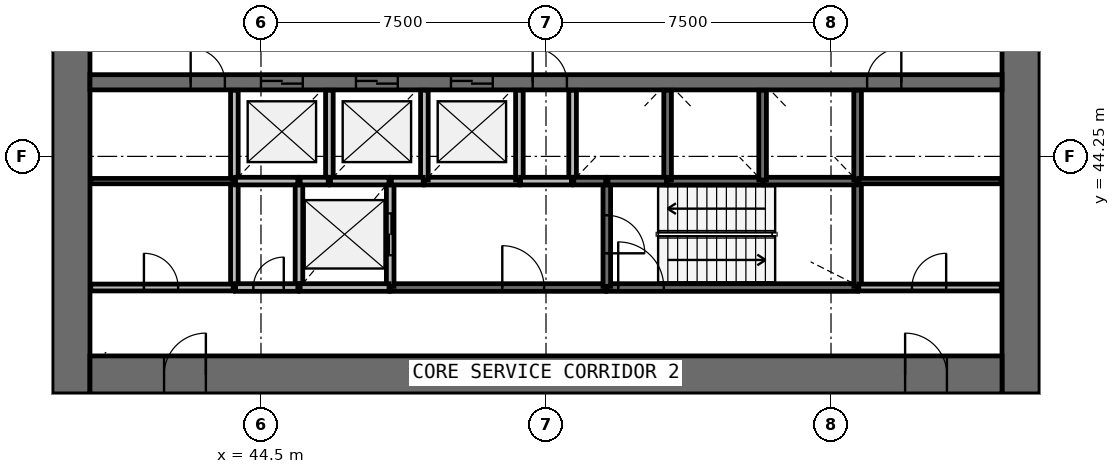
"""IFC4 building model, lengths in metres.
Left out: names, types, materials, properties, quantities, classifications, styles, units other than length and angle.
Written with IfcOpenShell. Run it as: python <this file> out.ifc"""

import sys

from ifc_helpers import new_model, si_unit, direction, frame, frame_2d, origin, place, context, subcontext, project, spatial, rectangle, extrude, source, transform, mapped, element, fill, save


model = new_model("IFC4")
c1 = context("Model", 3, precision=1e-05, world=origin(), true_north=direction((0.0, 1.0)))
c2 = subcontext(c1, "Body", "Model", "MODEL_VIEW")
j1 = project(units=[si_unit("LENGTHUNIT", "METRE"), si_unit("PLANEANGLEUNIT", "RADIAN")], contexts=[c1])
p1 = place(None, origin())
s1 = spatial("IfcSite", under=j1, at=p1, CompositionType="ELEMENT")
p2 = place(p1, origin())
s2 = spatial("IfcBuilding", under=s1, at=p2, CompositionType="ELEMENT")
p3 = place(p2, frame((0.0, 0.0, 18.2)))
s3 = spatial("IfcBuildingStorey", under=s2, at=p3, CompositionType="ELEMENT", Elevation=18.2)
p4 = place(p3, frame((64.5, 38.0, 0.0), z_axis=(0.0, 0.0, 1.0), x_axis=(0.0, 1.0, 0.0)))
e1 = element("IfcWall", 1, at=p4, inside=s3, PredefinedType="SHEAR", context=c2, shape_type="SweptSolid", body=[
    extrude(rectangle(XDim=20.0, YDim=1.0, at=frame_2d((10.0, 0.0))), origin(), (0.0, 0.0, 1.0), 4.4),
])
p5 = place(p4, frame((9.1, 0.0, 0.0)))
e2 = element("IfcOpeningElement", 2, at=p5, cuts=e1, PredefinedType="OPENING", context=c2, shape_type="SweptSolid", body=[
    extrude(rectangle(XDim=1.8, YDim=2.1, at=frame_2d((0.9, 1.05))), frame((0.0, 0.51, 0.0), z_axis=(0.0, -1.0, 0.0), x_axis=(1.0, 0.0, 0.0)), (0.0, 0.0, 1.0), 1.02),
])
p6 = place(p3, frame((39.5, 58.0, 0.0), z_axis=(0.0, 0.0, 1.0), x_axis=(0.0, -1.0, 0.0)))
e3 = element("IfcWall", 3, at=p6, inside=s3, PredefinedType="SHEAR", context=c2, shape_type="SweptSolid", body=[
    extrude(rectangle(XDim=20.0, YDim=1.0, at=frame_2d((10.0, 0.0))), origin(), (0.0, 0.0, 1.0), 4.4),
])
p7 = place(p6, frame((9.1, 0.0, 0.0)))
e4 = element("IfcOpeningElement", 4, at=p7, cuts=e3, PredefinedType="OPENING", context=c2, shape_type="SweptSolid", body=[
    extrude(rectangle(XDim=1.8, YDim=2.1, at=frame_2d((0.9, 1.05))), frame((0.0, 0.51, 0.0), z_axis=(0.0, -1.0, 0.0), x_axis=(1.0, 0.0, 0.0)), (0.0, 0.0, 1.0), 1.02),
])
p8 = place(p3, frame((40.0, 38.5, 0.0), z_axis=(0.0, 0.0, 1.0), x_axis=(1.0, 0.0, 0.0)))
e5 = element("IfcWall", 5, at=p8, inside=s3, PredefinedType="SHEAR", context=c2, shape_type="SweptSolid", body=[
    extrude(rectangle(XDim=24.0, YDim=1.0, at=frame_2d((12.0, 0.0))), origin(), (0.0, 0.0, 1.0), 4.4),
])
p9 = place(p8, frame((21.45, 0.0, 0.0)))
e6 = element("IfcOpeningElement", 6, at=p9, cuts=e5, PredefinedType="OPENING", context=c2, shape_type="SweptSolid", body=[
    extrude(rectangle(XDim=1.1, YDim=2.1, at=frame_2d((0.55, 1.05))), frame((0.0, 0.51, 0.0), z_axis=(0.0, -1.0, 0.0), x_axis=(1.0, 0.0, 0.0)), (0.0, 0.0, 1.0), 1.02),
])
p10 = place(p8, frame((1.95, 0.0, 0.0)))
e7 = element("IfcOpeningElement", 7, at=p10, cuts=e5, PredefinedType="OPENING", context=c2, shape_type="SweptSolid", body=[
    extrude(rectangle(XDim=1.1, YDim=2.1, at=frame_2d((0.55, 1.05))), frame((0.0, 0.51, 0.0), z_axis=(0.0, -1.0, 0.0), x_axis=(1.0, 0.0, 0.0)), (0.0, 0.0, 1.0), 1.02),
])
p11 = place(p3, frame((40.0, 46.2, 0.0), z_axis=(0.0, 0.0, 1.0), x_axis=(1.0, 0.0, 0.0)))
e8 = element("IfcWall", 8, at=p11, inside=s3, PredefinedType="SHEAR", context=c2, shape_type="SweptSolid", body=[
    extrude(rectangle(XDim=24.0, YDim=0.4, at=frame_2d((12.0, 0.0))), origin(), (0.0, 0.0, 1.0), 4.4),
])
p12 = place(p11, frame((4.5, 0.0, 0.0)))
e9 = element("IfcOpeningElement", 9, at=p12, cuts=e8, PredefinedType="OPENING", context=c2, shape_type="SweptSolid", body=[
    extrude(rectangle(XDim=1.1, YDim=2.1, at=frame_2d((0.55, 1.05))), frame((0.0, 0.21, 0.0), z_axis=(0.0, -1.0, 0.0), x_axis=(1.0, 0.0, 0.0)), (0.0, 0.0, 1.0), 0.42),
])
p13 = place(p11, frame((7.0, 0.0, 0.0)))
e10 = element("IfcOpeningElement", 10, at=p13, cuts=e8, PredefinedType="OPENING", context=c2, shape_type="SweptSolid", body=[
    extrude(rectangle(XDim=1.1, YDim=2.1, at=frame_2d((0.55, 1.05))), frame((0.0, 0.21, 0.0), z_axis=(0.0, -1.0, 0.0), x_axis=(1.0, 0.0, 0.0)), (0.0, 0.0, 1.0), 0.42),
])
p14 = place(p11, frame((9.5, 0.0, 0.0)))
e11 = element("IfcOpeningElement", 11, at=p14, cuts=e8, PredefinedType="OPENING", context=c2, shape_type="SweptSolid", body=[
    extrude(rectangle(XDim=1.1, YDim=2.1, at=frame_2d((0.55, 1.05))), frame((0.0, 0.21, 0.0), z_axis=(0.0, -1.0, 0.0), x_axis=(1.0, 0.0, 0.0)), (0.0, 0.0, 1.0), 0.42),
])
p15 = place(p11, frame((20.45, 0.0, 0.0)))
e12 = element("IfcOpeningElement", 12, at=p15, cuts=e8, PredefinedType="OPENING", context=c2, shape_type="SweptSolid", body=[
    extrude(rectangle(XDim=0.9, YDim=2.1, at=frame_2d((0.45, 1.05))), frame((0.0, 0.21, 0.0), z_axis=(0.0, -1.0, 0.0), x_axis=(1.0, 0.0, 0.0)), (0.0, 0.0, 1.0), 0.42),
])
p16 = place(p11, frame((2.65, 0.0, 0.0)))
e13 = element("IfcOpeningElement", 13, at=p16, cuts=e8, PredefinedType="OPENING", context=c2, shape_type="SweptSolid", body=[
    extrude(rectangle(XDim=0.9, YDim=2.1, at=frame_2d((0.45, 1.05))), frame((0.0, 0.21, 0.0), z_axis=(0.0, -1.0, 0.0), x_axis=(1.0, 0.0, 0.0)), (0.0, 0.0, 1.0), 0.42),
])
p17 = place(p11, frame((11.65, 0.0, 0.0)))
e14 = element("IfcOpeningElement", 14, at=p17, cuts=e8, PredefinedType="OPENING", context=c2, shape_type="SweptSolid", body=[
    extrude(rectangle(XDim=0.9, YDim=2.1, at=frame_2d((0.45, 1.05))), frame((0.0, 0.21, 0.0), z_axis=(0.0, -1.0, 0.0), x_axis=(1.0, 0.0, 0.0)), (0.0, 0.0, 1.0), 0.42),
])
p18 = place(p3, frame((53.6, 40.8, 0.0), z_axis=(0.0, 0.0, 1.0), x_axis=(1.0, 0.0, 0.0)))
e15 = element("IfcWall", 15, at=p18, inside=s3, PredefinedType="SOLIDWALL", context=c2, shape_type="SweptSolid", body=[
    extrude(rectangle(XDim=6.6, YDim=0.2, at=frame_2d((3.3, 0.0))), origin(), (0.0, 0.0, 1.0), 3.95),
])
p19 = place(p18, frame((0.3, 0.0, 0.0)))
e16 = element("IfcOpeningElement", 16, at=p19, cuts=e15, PredefinedType="OPENING", context=c2, shape_type="SweptSolid", body=[
    extrude(rectangle(XDim=1.2, YDim=2.1, at=frame_2d((0.6, 1.05))), frame((0.0, 0.11, 0.0), z_axis=(0.0, -1.0, 0.0), x_axis=(1.0, 0.0, 0.0)), (0.0, 0.0, 1.0), 0.22),
])
p20 = place(p3, frame((47.9, 40.8, 0.0), z_axis=(0.0, 0.0, 1.0), x_axis=(1.0, 0.0, 0.0)))
e17 = element("IfcWall", 17, at=p20, inside=s3, PredefinedType="SOLIDWALL", context=c2, shape_type="SweptSolid", body=[
    extrude(rectangle(XDim=5.67, YDim=0.2, at=frame_2d((2.835, 0.0))), origin(), (0.0, 0.0, 1.0), 3.95),
])
p21 = place(p20, frame((2.95, 0.0, 0.0)))
e18 = element("IfcOpeningElement", 18, at=p21, cuts=e17, PredefinedType="OPENING", context=c2, shape_type="SweptSolid", body=[
    extrude(rectangle(XDim=1.1, YDim=2.1, at=frame_2d((0.55, 1.05))), frame((0.0, 0.11, 0.0), z_axis=(0.0, -1.0, 0.0), x_axis=(1.0, 0.0, 0.0)), (0.0, 0.0, 1.0), 0.22),
])
for number, where, z_axis, x_axis in (
    (19, (43.8, 43.6, 0.0), (0.0, 0.0, 1.0), (0.0, -1.0, 0.0)),
    (20, (45.5, 43.6, 0.0), (0.0, 0.0, 1.0), (0.0, -1.0, 0.0)),
):
    element("IfcWall", number, at=place(p3, frame(where, z_axis=z_axis, x_axis=x_axis)), inside=s3, PredefinedType="SOLIDWALL", context=c2, shape_type="SweptSolid", body=[
        extrude(rectangle(XDim=2.8, YDim=0.2, at=frame_2d((1.4, 0.0))), origin(), (0.0, 0.0, 1.0), 3.95),
    ])
p22 = place(p3, frame((47.9, 40.83, 0.0), z_axis=(0.0, 0.0, 1.0), x_axis=(0.0, 1.0, 0.0)))
e21 = element("IfcWall", 21, at=p22, inside=s3, PredefinedType="SOLIDWALL", context=c2, shape_type="SweptSolid", body=[
    extrude(rectangle(XDim=2.77, YDim=0.2, at=frame_2d((1.385, 0.0))), origin(), (0.0, 0.0, 1.0), 3.95),
])
p23 = place(p22, frame((0.82, 0.0, 0.0)))
e22 = element("IfcOpeningElement", 22, at=p23, cuts=e21, PredefinedType="OPENING", context=c2, shape_type="SweptSolid", body=[
    extrude(rectangle(XDim=1.1, YDim=2.1, at=frame_2d((0.55, 1.05))), frame((0.0, 0.11, 0.0), z_axis=(0.0, -1.0, 0.0), x_axis=(1.0, 0.0, 0.0)), (0.0, 0.0, 1.0), 0.22),
])
p24 = place(p3, frame((60.2, 40.83, 0.0), z_axis=(0.0, 0.0, 1.0), x_axis=(0.0, 1.0, 0.0)))
e23 = element("IfcWall", 23, at=p24, inside=s3, PredefinedType="SOLIDWALL", context=c2, shape_type="SweptSolid", body=[
    extrude(rectangle(XDim=2.77, YDim=0.2, at=frame_2d((1.385, 0.0))), origin(), (0.0, 0.0, 1.0), 3.95),
])
p25 = place(p3, frame((53.6, 43.6, 0.0), z_axis=(0.0, 0.0, 1.0), x_axis=(0.0, -1.0, 0.0)))
e24 = element("IfcWall", 24, at=p25, inside=s3, PredefinedType="SOLIDWALL", context=c2, shape_type="SweptSolid", body=[
    extrude(rectangle(XDim=2.77, YDim=0.2, at=frame_2d((1.385, 0.0))), origin(), (0.0, 0.0, 1.0), 3.95),
])
p26 = place(p25, frame((0.9, 0.0, 0.0)))
e25 = element("IfcOpeningElement", 25, at=p26, cuts=e24, PredefinedType="OPENING", context=c2, shape_type="SweptSolid", body=[
    extrude(rectangle(XDim=1.0, YDim=2.1, at=frame_2d((0.5, 1.05))), frame((0.0, 0.11, 0.0), z_axis=(0.0, -1.0, 0.0), x_axis=(1.0, 0.0, 0.0)), (0.0, 0.0, 1.0), 0.22),
])
for number, where, z_axis, x_axis in (
    (26, (48.8, 43.6, 0.0), (0.0, 0.0, 1.0), (1.0, 0.0, 0.0)),
    (27, (55.2, 43.6, 0.0), (0.0, 0.0, 1.0), (1.0, 0.0, 0.0)),
):
    element("IfcWall", number, at=place(p3, frame(where, z_axis=z_axis, x_axis=x_axis)), inside=s3, PredefinedType="SOLIDWALL", context=c2, shape_type="SweptSolid", body=[
        extrude(rectangle(XDim=2.5, YDim=0.2, at=frame_2d((1.25, 0.0))), origin(), (0.0, 0.0, 1.0), 3.95),
    ])
p27 = place(p3, frame((57.73, 43.6, 0.0), z_axis=(0.0, 0.0, 1.0), x_axis=(1.0, 0.0, 0.0)))
e28 = element("IfcWall", 28, at=p27, inside=s3, PredefinedType="SOLIDWALL", context=c2, shape_type="SweptSolid", body=[
    extrude(rectangle(XDim=2.44, YDim=0.2, at=frame_2d((1.22, 0.0))), origin(), (0.0, 0.0, 1.0), 3.95),
])
p28 = place(p3, frame((45.53, 40.8, 0.0), z_axis=(0.0, 0.0, 1.0), x_axis=(1.0, 0.0, 0.0)))
e29 = element("IfcWall", 29, at=p28, inside=s3, PredefinedType="SOLIDWALL", context=c2, shape_type="SweptSolid", body=[
    extrude(rectangle(XDim=2.34, YDim=0.2, at=frame_2d((1.17, 0.0))), origin(), (0.0, 0.0, 1.0), 3.95),
])
p29 = place(p3, frame((43.8, 45.99, 0.0), z_axis=(0.0, 0.0, 1.0), x_axis=(0.0, -1.0, 0.0)))
e30 = element("IfcWall", 30, at=p29, inside=s3, PredefinedType="SOLIDWALL", context=c2, shape_type="SweptSolid", body=[
    extrude(rectangle(XDim=2.36, YDim=0.2, at=frame_2d((1.18, 0.0))), origin(), (0.0, 0.0, 1.0), 3.95),
])
p30 = place(p3, frame((46.3, 43.6, 0.0), z_axis=(0.0, 0.0, 1.0), x_axis=(0.0, 1.0, 0.0)))
e31 = element("IfcWall", 31, at=p30, inside=s3, PredefinedType="SOLIDWALL", context=c2, shape_type="SweptSolid", body=[
    extrude(rectangle(XDim=2.39, YDim=0.2, at=frame_2d((1.195, 0.0))), origin(), (0.0, 0.0, 1.0), 3.95),
])
for number, where, z_axis, x_axis in (
    (32, (48.8, 43.63, 0.0), (0.0, 0.0, 1.0), (0.0, 1.0, 0.0)),
    (33, (51.3, 43.63, 0.0), (0.0, 0.0, 1.0), (0.0, 1.0, 0.0)),
):
    element("IfcWall", number, at=place(p3, frame(where, z_axis=z_axis, x_axis=x_axis)), inside=s3, PredefinedType="SOLIDWALL", context=c2, shape_type="SweptSolid", body=[
        extrude(rectangle(XDim=2.36, YDim=0.2, at=frame_2d((1.18, 0.0))), origin(), (0.0, 0.0, 1.0), 3.95),
    ])
p31 = place(p3, frame((52.7, 45.99, 0.0), z_axis=(0.0, 0.0, 1.0), x_axis=(0.0, -1.0, 0.0)))
e34 = element("IfcWall", 34, at=p31, inside=s3, PredefinedType="SOLIDWALL", context=c2, shape_type="SweptSolid", body=[
    extrude(rectangle(XDim=2.39, YDim=0.2, at=frame_2d((1.195, 0.0))), origin(), (0.0, 0.0, 1.0), 3.95),
])
for number, where, z_axis, x_axis in (
    (35, (55.2, 43.63, 0.0), (0.0, 0.0, 1.0), (0.0, 1.0, 0.0)),
    (36, (57.7, 43.63, 0.0), (0.0, 0.0, 1.0), (0.0, 1.0, 0.0)),
    (37, (60.2, 43.63, 0.0), (0.0, 0.0, 1.0), (0.0, 1.0, 0.0)),
):
    element("IfcWall", number, at=place(p3, frame(where, z_axis=z_axis, x_axis=x_axis)), inside=s3, PredefinedType="SOLIDWALL", context=c2, shape_type="SweptSolid", body=[
        extrude(rectangle(XDim=2.36, YDim=0.2, at=frame_2d((1.18, 0.0))), origin(), (0.0, 0.0, 1.0), 3.95),
    ])
p32 = place(p3, frame((43.83, 43.6, 0.0), z_axis=(0.0, 0.0, 1.0), x_axis=(1.0, 0.0, 0.0)))
e38 = element("IfcWall", 38, at=p32, inside=s3, PredefinedType="SOLIDWALL", context=c2, shape_type="SweptSolid", body=[
    extrude(rectangle(XDim=1.64, YDim=0.2, at=frame_2d((0.82, 0.0))), origin(), (0.0, 0.0, 1.0), 3.95),
])
p33 = place(p3, frame((43.83, 40.8, 0.0), z_axis=(0.0, 0.0, 1.0), x_axis=(1.0, 0.0, 0.0)))
e39 = element("IfcWall", 39, at=p33, inside=s3, PredefinedType="SOLIDWALL", context=c2, shape_type="SweptSolid", body=[
    extrude(rectangle(XDim=1.64, YDim=0.2, at=frame_2d((0.82, 0.0))), origin(), (0.0, 0.0, 1.0), 3.95),
])
p34 = place(p33, frame((0.47, 0.0, 0.0)))
e40 = element("IfcOpeningElement", 40, at=p34, cuts=e39, PredefinedType="OPENING", context=c2, shape_type="SweptSolid", body=[
    extrude(rectangle(XDim=0.8, YDim=2.1, at=frame_2d((0.4, 1.05))), frame((0.0, 0.11, 0.0), z_axis=(0.0, -1.0, 0.0), x_axis=(1.0, 0.0, 0.0)), (0.0, 0.0, 1.0), 0.22),
])
for number, where, z_axis, x_axis in (
    (41, (46.33, 43.6, 0.0), (0.0, 0.0, 1.0), (1.0, 0.0, 0.0)),
    (42, (53.63, 43.6, 0.0), (0.0, 0.0, 1.0), (1.0, 0.0, 0.0)),
):
    element("IfcWall", number, at=place(p3, frame(where, z_axis=z_axis, x_axis=x_axis)), inside=s3, PredefinedType="SOLIDWALL", context=c2, shape_type="SweptSolid", body=[
        extrude(rectangle(XDim=1.54, YDim=0.2, at=frame_2d((0.77, 0.0))), origin(), (0.0, 0.0, 1.0), 3.95),
    ])
p35 = place(p3, frame((52.67, 43.6, 0.0), z_axis=(0.0, 0.0, 1.0), x_axis=(-1.0, 0.0, 0.0)))
e43 = element("IfcWall", 43, at=p35, inside=s3, PredefinedType="SOLIDWALL", context=c2, shape_type="SweptSolid", body=[
    extrude(rectangle(XDim=1.34, YDim=0.2, at=frame_2d((0.67, 0.0))), origin(), (0.0, 0.0, 1.0), 3.95),
])
for number, where, z_axis, x_axis in (
    (44, (47.93, 43.6, 0.0), (0.0, 0.0, 1.0), (1.0, 0.0, 0.0)),
    (45, (52.73, 43.6, 0.0), (0.0, 0.0, 1.0), (1.0, 0.0, 0.0)),
):
    element("IfcWall", number, at=place(p3, frame(where, z_axis=z_axis, x_axis=x_axis)), inside=s3, PredefinedType="SOLIDWALL", context=c2, shape_type="SweptSolid", body=[
        extrude(rectangle(XDim=0.84, YDim=0.2, at=frame_2d((0.42, 0.0))), origin(), (0.0, 0.0, 1.0), 3.95),
    ])
p36 = place(p3, frame((45.53, 43.6, 0.0), z_axis=(0.0, 0.0, 1.0), x_axis=(1.0, 0.0, 0.0)))
e46 = element("IfcWall", 46, at=p36, inside=s3, PredefinedType="SOLIDWALL", context=c2, shape_type="SweptSolid", body=[
    extrude(rectangle(XDim=0.74, YDim=0.2, at=frame_2d((0.37, 0.0))), origin(), (0.0, 0.0, 1.0), 3.95),
])
p37 = place(p3, frame((40.02, 40.8, 0.0), z_axis=(0.0, 0.0, 1.0), x_axis=(1.0, 0.0, 0.0)))
e47 = element("IfcWall", 47, at=p37, inside=s3, PredefinedType="PARTITIONING", context=c2, shape_type="SweptSolid", body=[
    extrude(rectangle(XDim=3.75, YDim=0.18, at=frame_2d((1.875, 0.0))), origin(), (0.0, 0.0, 1.0), 3.95),
])
p38 = place(p37, frame((1.4, 0.0, 0.0)))
e48 = element("IfcOpeningElement", 48, at=p38, cuts=e47, PredefinedType="OPENING", context=c2, shape_type="SweptSolid", body=[
    extrude(rectangle(XDim=0.9, YDim=2.1, at=frame_2d((0.45, 1.05))), frame((0.0, 0.1, 0.0), z_axis=(0.0, -1.0, 0.0), x_axis=(1.0, 0.0, 0.0)), (0.0, 0.0, 1.0), 0.2),
])
p39 = place(p3, frame((60.23, 40.8, 0.0), z_axis=(0.0, 0.0, 1.0), x_axis=(1.0, 0.0, 0.0)))
e49 = element("IfcWall", 49, at=p39, inside=s3, PredefinedType="PARTITIONING", context=c2, shape_type="SweptSolid", body=[
    extrude(rectangle(XDim=3.75, YDim=0.18, at=frame_2d((1.875, 0.0))), origin(), (0.0, 0.0, 1.0), 3.95),
])
p40 = place(p39, frame((1.4, 0.0, 0.0)))
e50 = element("IfcOpeningElement", 50, at=p40, cuts=e49, PredefinedType="OPENING", context=c2, shape_type="SweptSolid", body=[
    extrude(rectangle(XDim=0.9, YDim=2.1, at=frame_2d((0.45, 1.05))), frame((0.0, 0.1, 0.0), z_axis=(0.0, -1.0, 0.0), x_axis=(1.0, 0.0, 0.0)), (0.0, 0.0, 1.0), 0.2),
])
for number, where, z_axis, x_axis in (
    (51, (43.77, 43.6, 0.0), (0.0, 0.0, 1.0), (-1.0, 0.0, 0.0)),
    (52, (60.23, 43.6, 0.0), (0.0, 0.0, 1.0), (1.0, 0.0, 0.0)),
):
    element("IfcWall", number, at=place(p3, frame(where, z_axis=z_axis, x_axis=x_axis)), inside=s3, PredefinedType="PARTITIONING", context=c2, shape_type="SweptSolid", body=[
        extrude(rectangle(XDim=3.75, YDim=0.14, at=frame_2d((1.875, 0.0))), origin(), (0.0, 0.0, 1.0), 3.15),
    ])
m1 = source(origin(), c2, "Body", "SweptSolid", [
    extrude(rectangle(XDim=1.1, YDim=2.1, at=frame_2d((0.55, 1.05))), frame((0.0, 0.025, 0.0), z_axis=(0.0, -1.0, 0.0), x_axis=(1.0, 0.0, 0.0)), (0.0, 0.0, 1.0), 0.05),
])
p41 = place(p12, origin())
e53 = element("IfcDoor", 53, at=p41, inside=s3, OperationType="DOUBLE_DOOR_SLIDING", PredefinedType="USERDEFINED", context=c2, shape_type="MappedRepresentation", body=[
    mapped(m1, transform((0.0, 0.0, 0.0), scale=1.0)),
])
fill(e9, e53)
p42 = place(p13, origin())
e54 = element("IfcDoor", 54, at=p42, inside=s3, OperationType="DOUBLE_DOOR_SLIDING", PredefinedType="USERDEFINED", context=c2, shape_type="MappedRepresentation", body=[
    mapped(m1, transform((0.0, 0.0, 0.0), scale=1.0)),
])
fill(e10, e54)
p43 = place(p14, origin())
e55 = element("IfcDoor", 55, at=p43, inside=s3, OperationType="DOUBLE_DOOR_SLIDING", PredefinedType="USERDEFINED", context=c2, shape_type="MappedRepresentation", body=[
    mapped(m1, transform((0.0, 0.0, 0.0), scale=1.0)),
])
fill(e11, e55)
p44 = place(p23, origin())
e56 = element("IfcDoor", 56, at=p44, inside=s3, OperationType="DOUBLE_DOOR_SLIDING", PredefinedType="USERDEFINED", context=c2, shape_type="MappedRepresentation", body=[
    mapped(m1, transform((0.0, 0.0, 0.0), scale=1.0)),
])
fill(e22, e56)
m2 = source(origin(), c2, "Body", "SweptSolid", [
    extrude(rectangle(XDim=1.2, YDim=2.1, at=frame_2d((0.6, 1.05))), frame((0.0, 0.025, 0.0), z_axis=(0.0, -1.0, 0.0), x_axis=(1.0, 0.0, 0.0)), (0.0, 0.0, 1.0), 0.05),
])
p45 = place(p19, origin())
e57 = element("IfcDoor", 57, at=p45, inside=s3, OperationType="SINGLE_SWING_LEFT", PredefinedType="DOOR", context=c2, shape_type="MappedRepresentation", body=[
    mapped(m2, transform((0.0, 0.0, 0.0), scale=1.0)),
])
fill(e16, e57)
m3 = source(origin(), c2, "Body", "SweptSolid", [
    extrude(rectangle(XDim=1.0, YDim=2.1, at=frame_2d((0.5, 1.05))), frame((0.0, 0.025, 0.0), z_axis=(0.0, -1.0, 0.0), x_axis=(1.0, 0.0, 0.0)), (0.0, 0.0, 1.0), 0.05),
])
p46 = place(p26, origin())
e58 = element("IfcDoor", 58, at=p46, inside=s3, OperationType="SINGLE_SWING_RIGHT", PredefinedType="DOOR", context=c2, shape_type="MappedRepresentation", body=[
    mapped(m3, transform((0.0, 0.0, 0.0), scale=1.0)),
])
fill(e25, e58)
m4 = source(origin(), c2, "Body", "SweptSolid", [
    extrude(rectangle(XDim=1.1, YDim=2.1, at=frame_2d((0.55, 1.05))), frame((0.0, 0.025, 0.0), z_axis=(0.0, -1.0, 0.0), x_axis=(1.0, 0.0, 0.0)), (0.0, 0.0, 1.0), 0.05),
])
p47 = place(p21, origin())
e59 = element("IfcDoor", 59, at=p47, inside=s3, OperationType="SINGLE_SWING_LEFT", PredefinedType="DOOR", context=c2, shape_type="MappedRepresentation", body=[
    mapped(m4, transform((0.0, 0.0, 0.0), scale=1.0)),
])
fill(e18, e59)
m5 = source(origin(), c2, "Body", "SweptSolid", [
    extrude(rectangle(XDim=0.8, YDim=2.1, at=frame_2d((0.4, 1.05))), frame((0.0, 0.025, 0.0), z_axis=(0.0, -1.0, 0.0), x_axis=(1.0, 0.0, 0.0)), (0.0, 0.0, 1.0), 0.05),
])
p48 = place(p34, origin())
e60 = element("IfcDoor", 60, at=p48, inside=s3, OperationType="SINGLE_SWING_RIGHT", PredefinedType="DOOR", context=c2, shape_type="MappedRepresentation", body=[
    mapped(m5, transform((0.0, 0.0, 0.0), scale=1.0)),
])
fill(e40, e60)
m6 = source(origin(), c2, "Body", "SweptSolid", [
    extrude(rectangle(XDim=1.1, YDim=2.1, at=frame_2d((0.55, 1.05))), frame((0.0, 0.025, 0.0), z_axis=(0.0, -1.0, 0.0), x_axis=(1.0, 0.0, 0.0)), (0.0, 0.0, 1.0), 0.05),
])
p49 = place(p9, origin())
e61 = element("IfcDoor", 61, at=p49, inside=s3, OperationType="SINGLE_SWING_LEFT", PredefinedType="DOOR", context=c2, shape_type="MappedRepresentation", body=[
    mapped(m6, transform((0.0, 0.0, 0.0), scale=1.0)),
])
fill(e6, e61)
p50 = place(p10, origin())
e62 = element("IfcDoor", 62, at=p50, inside=s3, OperationType="SINGLE_SWING_RIGHT", PredefinedType="DOOR", context=c2, shape_type="MappedRepresentation", body=[
    mapped(m6, transform((0.0, 0.0, 0.0), scale=1.0)),
])
fill(e7, e62)
m7 = source(origin(), c2, "Body", "SweptSolid", [
    extrude(rectangle(XDim=0.9, YDim=2.1, at=frame_2d((0.45, 1.05))), frame((0.0, 0.025, 0.0), z_axis=(0.0, -1.0, 0.0), x_axis=(1.0, 0.0, 0.0)), (0.0, 0.0, 1.0), 0.05),
])
p51 = place(p38, origin())
e63 = element("IfcDoor", 63, at=p51, inside=s3, OperationType="SINGLE_SWING_LEFT", PredefinedType="DOOR", context=c2, shape_type="MappedRepresentation", body=[
    mapped(m7, transform((0.0, 0.0, 0.0), scale=1.0)),
])
fill(e48, e63)
p52 = place(p15, origin())
e64 = element("IfcDoor", 64, at=p52, inside=s3, OperationType="SINGLE_SWING_RIGHT", PredefinedType="DOOR", context=c2, shape_type="MappedRepresentation", body=[
    mapped(m7, transform((0.0, 0.0, 0.0), scale=1.0)),
])
fill(e12, e64)
p53 = place(p40, origin())
e65 = element("IfcDoor", 65, at=p53, inside=s3, OperationType="SINGLE_SWING_RIGHT", PredefinedType="DOOR", context=c2, shape_type="MappedRepresentation", body=[
    mapped(m7, transform((0.0, 0.0, 0.0), scale=1.0)),
])
fill(e50, e65)
p54 = place(p16, origin())
e66 = element("IfcDoor", 66, at=p54, inside=s3, OperationType="SINGLE_SWING_LEFT", PredefinedType="DOOR", context=c2, shape_type="MappedRepresentation", body=[
    mapped(m7, transform((0.0, 0.0, 0.0), scale=1.0)),
])
fill(e13, e66)
p55 = place(p17, origin())
e67 = element("IfcDoor", 67, at=p55, inside=s3, OperationType="SINGLE_SWING_LEFT", PredefinedType="DOOR", context=c2, shape_type="MappedRepresentation", body=[
    mapped(m7, transform((0.0, 0.0, 0.0), scale=1.0)),
])
fill(e14, e67)
save(model, sys.argv[1])
